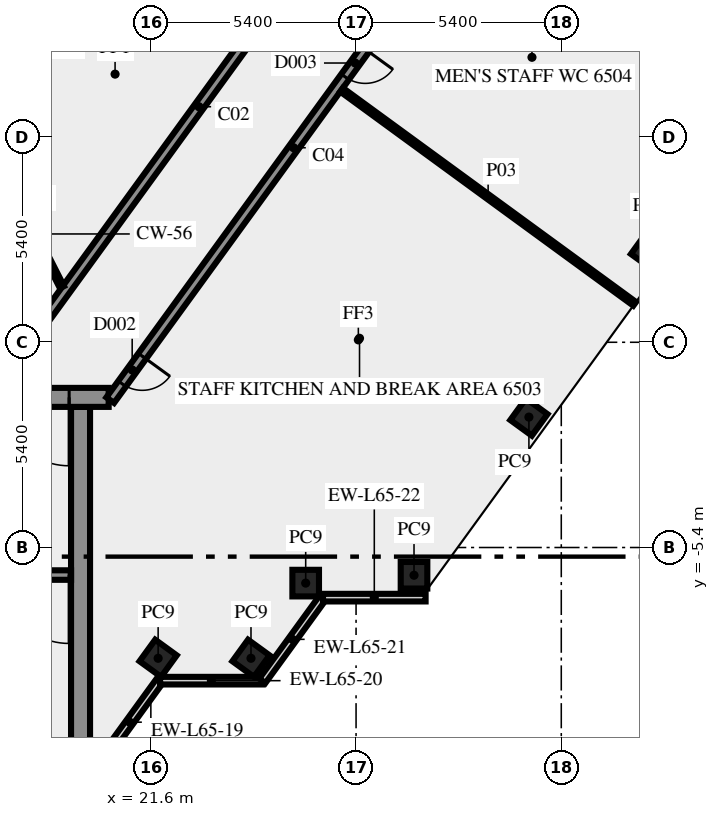
"""IFC4 building model, lengths in metres.
Left out: names, types, materials, properties, quantities, classifications, styles, units other than length and angle.
Written with IfcOpenShell. Run it as: python <this file> out.ifc"""

import sys

from ifc_helpers import new_model, si_unit, direction, frame, frame_2d, origin, origin_2d, place, context, subcontext, project, spatial, rectangle, extrude, element, fill, save


model = new_model("IFC4")
c1 = context("Model", 3, precision=1e-05, world=origin(), true_north=direction((0.0, 1.0)))
c2 = subcontext(c1, "Body", "Model", "MODEL_VIEW")
j1 = project(units=[si_unit("LENGTHUNIT", "METRE"), si_unit("PLANEANGLEUNIT", "RADIAN")], contexts=[c1])
p1 = place(None, origin())
s1 = spatial("IfcSite", under=j1, at=p1, CompositionType="ELEMENT")
p2 = place(p1, origin())
s2 = spatial("IfcBuilding", under=s1, at=p2, CompositionType="ELEMENT")
p3 = place(p2, frame((0.0, 0.0, 281.0)))
s3 = spatial("IfcBuildingStorey", under=s2, at=p3, CompositionType="ELEMENT", Elevation=281.0)
for number, where, z_axis, x_axis in (
    (1, (21.792, -8.315, 0.0), (0.0, 0.0, 1.0), (0.588, 0.809, 0.0)),
    (2, (24.235, -8.315, 0.0), (0.0, 0.0, 1.0), (0.588, 0.809, 0.0)),
    (3, (25.674, -6.337, 0.0), (0.0, 0.0, 1.0), (1.0, 0.0, 0.0)),
    (4, (28.525, -6.13, 0.0), (0.0, 0.0, 1.0), (1.0, 0.0, 0.0)),
    (5, (31.548, -1.969, 0.0), (0.0, 0.0, 1.0), (0.588, 0.809, 0.0)),
    (6, (34.722, 2.4, 0.0), (0.0, 0.0, 1.0), (0.588, 0.809, 0.0)),
):
    element("IfcColumn", number, at=place(p3, frame(where, z_axis=z_axis, x_axis=x_axis)), inside=s3, PredefinedType="COLUMN", context=c2, shape_type="SweptSolid", body=[
        extrude(rectangle(XDim=0.7, YDim=0.7, at=origin_2d()), origin(), (0.0, 0.0, 1.0), 3.65),
    ])
p4 = place(p3, frame((20.253, -11.083, 0.0), z_axis=(0.0, 0.0, 1.0), x_axis=(0.587766567315, 0.809030569476, 0.0)))
e7 = element("IfcWall", 7, at=p4, inside=s3, PredefinedType="SOLIDWALL", context=c2, shape_type="SweptSolid", body=[
    extrude(rectangle(XDim=2.688, YDim=0.2, at=frame_2d((1.344, 0.0))), origin(), (0.0, 0.0, 1.0), 3.65),
])
p5 = place(p3, frame((21.843, -8.904, 0.0), z_axis=(0.0, 0.0, 1.0), x_axis=(1.0, 0.0, 0.0)))
e8 = element("IfcWall", 8, at=p5, inside=s3, PredefinedType="SOLIDWALL", context=c2, shape_type="SweptSolid", body=[
    extrude(rectangle(XDim=2.7, YDim=0.2, at=frame_2d((1.35, 0.0))), origin(), (0.0, 0.0, 1.0), 3.65),
])
p6 = place(p3, frame((24.533, -8.909, 0.0), z_axis=(0.0, 0.0, 1.0), x_axis=(0.587720002413, 0.809064397168, 0.0)))
e9 = element("IfcWall", 9, at=p6, inside=s3, PredefinedType="SOLIDWALL", context=c2, shape_type="SweptSolid", body=[
    extrude(rectangle(XDim=2.7, YDim=0.2, at=frame_2d((1.35, 0.0))), origin(), (0.0, 0.0, 1.0), 3.65),
])
p7 = place(p3, frame((26.13, -6.719, 0.0), z_axis=(0.0, 0.0, 1.0), x_axis=(1.0, 0.0, 0.0)))
e10 = element("IfcWall", 10, at=p7, inside=s3, PredefinedType="SOLIDWALL", context=c2, shape_type="SweptSolid", body=[
    extrude(rectangle(XDim=2.7, YDim=0.2, at=frame_2d((1.35, 0.0))), origin(), (0.0, 0.0, 1.0), 3.65),
])
p8 = place(p3, frame((19.75, -10.5, 0.0), z_axis=(0.0, 0.0, 1.0), x_axis=(0.0, 1.0, 0.0)))
e11 = element("IfcWall", 11, at=p8, inside=s3, PredefinedType="SHEAR", context=c2, shape_type="SweptSolid", body=[
    extrude(rectangle(XDim=8.8, YDim=0.5, at=frame_2d((4.4, 0.0))), origin(), (0.0, 0.0, 1.0), 3.65),
])
p9 = place(p3, frame((19.5, -6.125, 0.0), z_axis=(0.0, 0.0, 1.0), x_axis=(-1.0, 0.0, 0.0)))
e12 = element("IfcWall", 12, at=p9, inside=s3, PredefinedType="SHEAR", context=c2, shape_type="SweptSolid", body=[
    extrude(rectangle(XDim=8.05, YDim=0.25, at=frame_2d((4.025, 0.0))), origin(), (0.0, 0.0, 1.0), 3.65),
])
p10 = place(p9, frame((0.05, 0.0, 0.0)))
e13 = element("IfcOpeningElement", 13, at=p10, cuts=e12, PredefinedType="OPENING", context=c2, shape_type="SweptSolid", body=[
    extrude(rectangle(XDim=1.8, YDim=2.1, at=frame_2d((0.9, 1.05))), frame((0.0, 0.135, 0.0), z_axis=(0.0, -1.0, 0.0), x_axis=(1.0, 0.0, 0.0)), (0.0, 0.0, 1.0), 0.27),
])
p11 = place(p3, frame((20.49, -1.45, 0.0), z_axis=(0.0, 0.0, 1.0), x_axis=(-1.0, 0.0, 0.0)))
e14 = element("IfcWall", 14, at=p11, inside=s3, PredefinedType="SHEAR", context=c2, shape_type="SweptSolid", body=[
    extrude(rectangle(XDim=40.98, YDim=0.5, at=frame_2d((20.49, 0.0))), origin(), (0.0, 0.0, 1.0), 3.65),
])
p12 = place(p11, frame((38.14, 0.0, 0.0)))
e15 = element("IfcOpeningElement", 15, at=p12, cuts=e14, PredefinedType="OPENING", context=c2, shape_type="SweptSolid", body=[
    extrude(rectangle(XDim=1.8, YDim=2.1, at=frame_2d((0.9, 1.05))), frame((0.0, 0.26, 0.0), z_axis=(0.0, -1.0, 0.0), x_axis=(1.0, 0.0, 0.0)), (0.0, 0.0, 1.0), 0.52),
])
p13 = place(p11, frame((36.728, 0.0, 0.0)))
e16 = element("IfcOpeningElement", 16, at=p13, cuts=e14, PredefinedType="OPENING", context=c2, shape_type="SweptSolid", body=[
    extrude(rectangle(XDim=0.8, YDim=2.1, at=frame_2d((0.4, 1.05))), frame((0.0, 0.26, 0.0), z_axis=(0.0, -1.0, 0.0), x_axis=(1.0, 0.0, 0.0)), (0.0, 0.0, 1.0), 0.52),
])
p14 = place(p11, frame((35.153, 0.0, 0.0)))
e17 = element("IfcOpeningElement", 17, at=p14, cuts=e14, PredefinedType="OPENING", context=c2, shape_type="SweptSolid", body=[
    extrude(rectangle(XDim=0.8, YDim=2.1, at=frame_2d((0.4, 1.05))), frame((0.0, 0.26, 0.0), z_axis=(0.0, -1.0, 0.0), x_axis=(1.0, 0.0, 0.0)), (0.0, 0.0, 1.0), 0.52),
])
p15 = place(p11, frame((32.94, 0.0, 0.0)))
e18 = element("IfcOpeningElement", 18, at=p15, cuts=e14, PredefinedType="OPENING", context=c2, shape_type="SweptSolid", body=[
    extrude(rectangle(XDim=0.9, YDim=2.1, at=frame_2d((0.45, 1.05))), frame((0.0, 0.26, 0.0), z_axis=(0.0, -1.0, 0.0), x_axis=(1.0, 0.0, 0.0)), (0.0, 0.0, 1.0), 0.52),
])
p16 = place(p11, frame((31.015, 0.0, 0.0)))
e19 = element("IfcOpeningElement", 19, at=p16, cuts=e14, PredefinedType="OPENING", context=c2, shape_type="SweptSolid", body=[
    extrude(rectangle(XDim=0.8, YDim=2.1, at=frame_2d((0.4, 1.05))), frame((0.0, 0.26, 0.0), z_axis=(0.0, -1.0, 0.0), x_axis=(1.0, 0.0, 0.0)), (0.0, 0.0, 1.0), 0.52),
])
p17 = place(p11, frame((24.765, 0.0, 0.0)))
e20 = element("IfcOpeningElement", 20, at=p17, cuts=e14, PredefinedType="OPENING", context=c2, shape_type="SweptSolid", body=[
    extrude(rectangle(XDim=0.8, YDim=2.1, at=frame_2d((0.4, 1.05))), frame((0.0, 0.26, 0.0), z_axis=(0.0, -1.0, 0.0), x_axis=(1.0, 0.0, 0.0)), (0.0, 0.0, 1.0), 0.52),
])
p18 = place(p11, frame((19.59, 0.0, 0.0)))
e21 = element("IfcOpeningElement", 21, at=p18, cuts=e14, PredefinedType="OPENING", context=c2, shape_type="SweptSolid", body=[
    extrude(rectangle(XDim=2.0, YDim=2.1, at=frame_2d((1.0, 1.05))), frame((0.0, 0.26, 0.0), z_axis=(0.0, -1.0, 0.0), x_axis=(1.0, 0.0, 0.0)), (0.0, 0.0, 1.0), 0.52),
])
p19 = place(p11, frame((13.202, 0.0, 0.0)))
e22 = element("IfcOpeningElement", 22, at=p19, cuts=e14, PredefinedType="OPENING", context=c2, shape_type="SweptSolid", body=[
    extrude(rectangle(XDim=0.9, YDim=2.1, at=frame_2d((0.45, 1.05))), frame((0.0, 0.26, 0.0), z_axis=(0.0, -1.0, 0.0), x_axis=(1.0, 0.0, 0.0)), (0.0, 0.0, 1.0), 0.52),
])
p20 = place(p11, frame((9.478, 0.0, 0.0)))
e23 = element("IfcOpeningElement", 23, at=p20, cuts=e14, PredefinedType="OPENING", context=c2, shape_type="SweptSolid", body=[
    extrude(rectangle(XDim=0.9, YDim=2.1, at=frame_2d((0.45, 1.05))), frame((0.0, 0.26, 0.0), z_axis=(0.0, -1.0, 0.0), x_axis=(1.0, 0.0, 0.0)), (0.0, 0.0, 1.0), 0.52),
])
p21 = place(p11, frame((7.14, 0.0, 0.0)))
e24 = element("IfcOpeningElement", 24, at=p21, cuts=e14, PredefinedType="OPENING", context=c2, shape_type="SweptSolid", body=[
    extrude(rectangle(XDim=0.9, YDim=2.1, at=frame_2d((0.45, 1.05))), frame((0.0, 0.26, 0.0), z_axis=(0.0, -1.0, 0.0), x_axis=(1.0, 0.0, 0.0)), (0.0, 0.0, 1.0), 0.52),
])
p22 = place(p11, frame((4.19, 0.0, 0.0)))
e25 = element("IfcOpeningElement", 25, at=p22, cuts=e14, PredefinedType="OPENING", context=c2, shape_type="SweptSolid", body=[
    extrude(rectangle(XDim=0.9, YDim=2.1, at=frame_2d((0.45, 1.05))), frame((0.0, 0.26, 0.0), z_axis=(0.0, -1.0, 0.0), x_axis=(1.0, 0.0, 0.0)), (0.0, 0.0, 1.0), 0.52),
])
p23 = place(p11, frame((1.04, 0.0, 0.0)))
e26 = element("IfcOpeningElement", 26, at=p23, cuts=e14, PredefinedType="OPENING", context=c2, shape_type="SweptSolid", body=[
    extrude(rectangle(XDim=1.8, YDim=2.1, at=frame_2d((0.9, 1.05))), frame((0.0, 0.26, 0.0), z_axis=(0.0, -1.0, 0.0), x_axis=(1.0, 0.0, 0.0)), (0.0, 0.0, 1.0), 0.52),
])
p24 = place(p3, frame((17.545, -1.125, 0.0), z_axis=(0.0, 0.0, 1.0), x_axis=(0.58779555165, 0.809009511354, 0.0)))
e27 = element("IfcWall", 27, at=p24, inside=s3, PredefinedType="SOLIDWALL", context=c2, shape_type="SweptSolid", body=[
    extrude(rectangle(XDim=18.103, YDim=0.25, at=frame_2d((9.052, 0.0))), origin(), (0.0, 0.0, 1.0), 3.65),
])
p25 = place(p24, frame((16.728, 0.0, 0.0)))
e28 = element("IfcOpeningElement", 28, at=p25, cuts=e27, PredefinedType="OPENING", context=c2, shape_type="SweptSolid", body=[
    extrude(rectangle(XDim=0.9, YDim=2.1, at=frame_2d((0.45, 1.05))), frame((0.0, 0.135, 0.0), z_axis=(0.0, -1.0, 0.0), x_axis=(1.0, 0.0, 0.0)), (0.0, 0.0, 1.0), 0.27),
])
p26 = place(p3, frame((30.183, 11.761, 0.0), z_axis=(0.0, 0.0, 1.0), x_axis=(-0.587781762867, -0.80901952958, 0.0)))
e29 = element("IfcWall", 29, at=p26, inside=s3, PredefinedType="SOLIDWALL", context=c2, shape_type="SweptSolid", body=[
    extrude(rectangle(XDim=16.42, YDim=0.25, at=frame_2d((8.21, 0.0))), origin(), (0.0, 0.0, 1.0), 3.65),
])
p27 = place(p26, frame((5.005, 0.0, 0.0)))
e30 = element("IfcOpeningElement", 30, at=p27, cuts=e29, PredefinedType="OPENING", context=c2, shape_type="SweptSolid", body=[
    extrude(rectangle(XDim=0.9, YDim=2.1, at=frame_2d((0.45, 1.05))), frame((0.0, 0.135, 0.0), z_axis=(0.0, -1.0, 0.0), x_axis=(1.0, 0.0, 0.0)), (0.0, 0.0, 1.0), 0.27),
])
p28 = place(p26, frame((14.988, 0.0, 0.0)))
e31 = element("IfcOpeningElement", 31, at=p28, cuts=e29, PredefinedType="OPENING", context=c2, shape_type="SweptSolid", body=[
    extrude(rectangle(XDim=0.9, YDim=2.1, at=frame_2d((0.45, 1.05))), frame((0.0, 0.135, 0.0), z_axis=(0.0, -1.0, 0.0), x_axis=(1.0, 0.0, 0.0)), (0.0, 0.0, 1.0), 0.27),
])
p29 = place(p3, frame((37.458, 6.76, 0.0), z_axis=(0.0, 0.0, 1.0), x_axis=(-0.809016295501, 0.587786214209, 0.0)))
e32 = element("IfcWall", 32, at=p29, inside=s3, PredefinedType="PARTITIONING", context=c2, shape_type="SweptSolid", body=[
    extrude(rectangle(XDim=8.7, YDim=0.15, at=frame_2d((4.35, 0.0))), origin(), (0.0, 0.0, 1.0), 3.65),
])
p30 = place(p3, frame((26.619, 6.643, 0.0), z_axis=(0.0, 0.0, 1.0), x_axis=(0.807594822539, -0.589737740532, 0.0)))
e33 = element("IfcWall", 33, at=p30, inside=s3, PredefinedType="PARTITIONING", context=c2, shape_type="SweptSolid", body=[
    extrude(rectangle(XDim=9.55, YDim=0.12, at=frame_2d((4.775, 0.0))), origin(), (0.0, 0.0, 1.0), 2.95),
])
p31 = place(p3, frame((18.0, 3.925, 0.0), z_axis=(0.0, 0.0, 1.0), x_axis=(0.453950796792, -0.891026752736, 0.0)))
e34 = element("IfcWall", 34, at=p31, inside=s3, PredefinedType="PARTITIONING", context=c2, shape_type="SweptSolid", body=[
    extrude(rectangle(XDim=2.778, YDim=0.12, at=frame_2d((1.389, 0.0))), origin(), (0.0, 0.0, 1.0), 3.65),
])
p32 = place(p10, origin())
e35 = element("IfcDoor", 35, at=p32, inside=s3, OperationType="DOUBLE_DOOR_SINGLE_SWING", PredefinedType="DOOR", context=c2, shape_type="SweptSolid", body=[
    extrude(rectangle(XDim=1.8, YDim=2.1, at=frame_2d((0.9, 1.05))), frame((0.0, 0.025, 0.0), z_axis=(0.0, -1.0, 0.0), x_axis=(1.0, 0.0, 0.0)), (0.0, 0.0, 1.0), 0.05),
])
fill(e13, e35)
p33 = place(p23, origin())
e36 = element("IfcDoor", 36, at=p33, inside=s3, OperationType="DOUBLE_DOOR_SINGLE_SWING", PredefinedType="DOOR", context=c2, shape_type="SweptSolid", body=[
    extrude(rectangle(XDim=1.8, YDim=2.1, at=frame_2d((0.9, 1.05))), frame((0.0, 0.025, 0.0), z_axis=(0.0, -1.0, 0.0), x_axis=(1.0, 0.0, 0.0)), (0.0, 0.0, 1.0), 0.05),
])
fill(e26, e36)
p34 = place(p27, origin())
e37 = element("IfcDoor", 37, at=p34, inside=s3, OperationType="SINGLE_SWING_RIGHT", PredefinedType="DOOR", context=c2, shape_type="SweptSolid", body=[
    extrude(rectangle(XDim=0.9, YDim=2.1, at=frame_2d((0.45, 1.05))), frame((0.0, 0.025, 0.0), z_axis=(0.0, -1.0, 0.0), x_axis=(1.0, 0.0, 0.0)), (0.0, 0.0, 1.0), 0.05),
])
fill(e30, e37)
p35 = place(p28, origin())
e38 = element("IfcDoor", 38, at=p35, inside=s3, OperationType="SINGLE_SWING_RIGHT", PredefinedType="DOOR", context=c2, shape_type="SweptSolid", body=[
    extrude(rectangle(XDim=0.9, YDim=2.1, at=frame_2d((0.45, 1.05))), frame((0.0, 0.025, 0.0), z_axis=(0.0, -1.0, 0.0), x_axis=(1.0, 0.0, 0.0)), (0.0, 0.0, 1.0), 0.05),
])
fill(e31, e38)
save(model, sys.argv[1])
